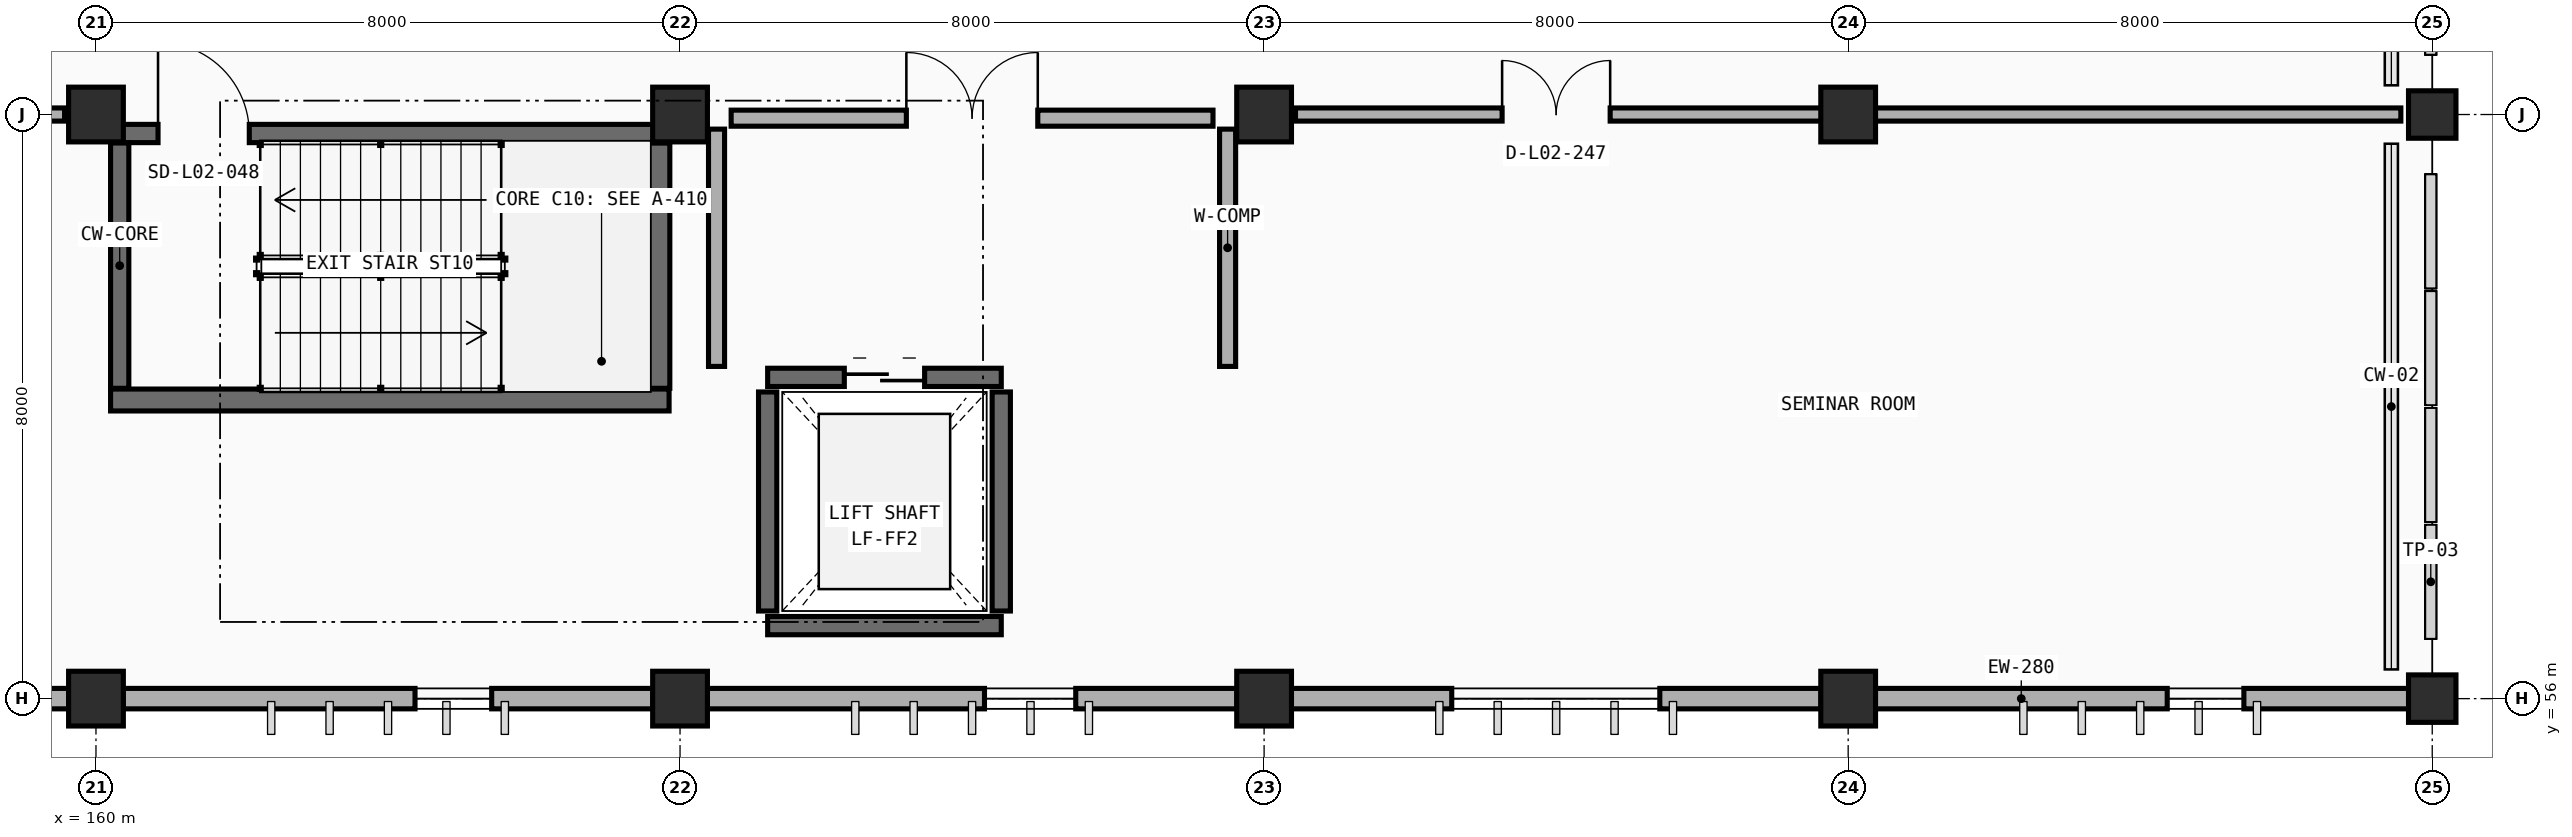
"""IFC4 building model, lengths in metres.
Left out: names, types, materials, properties, quantities, classifications, styles, units other than length and angle.
Written with IfcOpenShell. Run it as: python <this file> out.ifc"""

import sys

from ifc_helpers import new_model, si_unit, direction, frame, frame_2d, origin, origin_2d, place, context, subcontext, project, spatial, rectangle, extrude, element, fill, save


model = new_model("IFC4")
c1 = context("Model", 3, precision=1e-05, world=origin(), true_north=direction((0.0, 1.0)))
c2 = subcontext(c1, "Body", "Model", "MODEL_VIEW")
j1 = project(units=[si_unit("LENGTHUNIT", "METRE"), si_unit("PLANEANGLEUNIT", "RADIAN")], contexts=[c1])
p1 = place(None, origin())
s1 = spatial("IfcSite", under=j1, at=p1, CompositionType="ELEMENT")
p2 = place(p1, origin())
s2 = spatial("IfcBuilding", under=s1, at=p2, CompositionType="ELEMENT")
p3 = place(p2, frame((0.0, 0.0, 4.8)))
s3 = spatial("IfcBuildingStorey", under=s2, at=p3, CompositionType="ELEMENT", Elevation=4.8)
for number, where, z_axis, x_axis in (
    (1, (160.0, 56.0, 0.0), (0.0, 0.0, 1.0), (1.0, 0.0, 0.0)),
    (2, (168.0, 56.0, 0.0), (0.0, 0.0, 1.0), (1.0, 0.0, 0.0)),
    (3, (176.0, 56.0, 0.0), (0.0, 0.0, 1.0), (1.0, 0.0, 0.0)),
    (4, (184.0, 56.0, 0.0), (0.0, 0.0, 1.0), (1.0, 0.0, 0.0)),
):
    element("IfcColumn", number, at=place(p3, frame(where, z_axis=z_axis, x_axis=x_axis)), inside=s3, PredefinedType="COLUMN", context=c2, shape_type="SweptSolid", body=[
        extrude(rectangle(XDim=0.75, YDim=0.75, at=origin_2d()), origin(), (0.0, 0.0, 1.0), 4.8),
    ])
p4 = place(p3, frame((192.0, 56.0, 0.0), z_axis=(0.0, 0.0, 1.0), x_axis=(1.0, 0.0, 0.0)))
e5 = element("IfcColumn", 5, at=p4, inside=s3, PredefinedType="COLUMN", context=c2, shape_type="SweptSolid", body=[
    extrude(rectangle(XDim=0.65, YDim=0.65, at=origin_2d()), origin(), (0.0, 0.0, 1.0), 4.8),
])
for number, where, z_axis, x_axis in (
    (6, (160.0, 64.0, 0.0), (0.0, 0.0, 1.0), (1.0, 0.0, 0.0)),
    (7, (168.0, 64.0, 0.0), (0.0, 0.0, 1.0), (1.0, 0.0, 0.0)),
    (8, (176.0, 64.0, 0.0), (0.0, 0.0, 1.0), (1.0, 0.0, 0.0)),
    (9, (184.0, 64.0, 0.0), (0.0, 0.0, 1.0), (1.0, 0.0, 0.0)),
):
    element("IfcColumn", number, at=place(p3, frame(where, z_axis=z_axis, x_axis=x_axis)), inside=s3, PredefinedType="COLUMN", context=c2, shape_type="SweptSolid", body=[
        extrude(rectangle(XDim=0.75, YDim=0.75, at=origin_2d()), origin(), (0.0, 0.0, 1.0), 4.8),
    ])
p5 = place(p3, frame((192.0, 64.0, 0.0), z_axis=(0.0, 0.0, 1.0), x_axis=(1.0, 0.0, 0.0)))
e10 = element("IfcColumn", 10, at=p5, inside=s3, PredefinedType="COLUMN", context=c2, shape_type="SweptSolid", body=[
    extrude(rectangle(XDim=0.65, YDim=0.65, at=origin_2d()), origin(), (0.0, 0.0, 1.0), 4.8),
])
p6 = place(p3, frame((159.628, 56.0, 0.0), z_axis=(0.0, 0.0, 1.0), x_axis=(-1.0, 0.0, 0.0)))
e11 = element("IfcWall", 11, at=p6, inside=s3, PredefinedType="STANDARD", context=c2, shape_type="SweptSolid", body=[
    extrude(rectangle(XDim=7.256, YDim=0.28, at=frame_2d((3.628, 0.0))), origin(), (0.0, 0.0, 1.0), 3.91),
])
p7 = place(p6, frame((2.208, 0.0, 0.9)))
e12 = element("IfcOpeningElement", 12, at=p7, cuts=e11, PredefinedType="OPENING", context=c2, shape_type="SweptSolid", body=[
    extrude(rectangle(XDim=2.85, YDim=1.85, at=frame_2d((1.425, 0.925))), frame((0.0, 0.15, 0.0), z_axis=(0.0, -1.0, 0.0), x_axis=(1.0, 0.0, 0.0)), (0.0, 0.0, 1.0), 0.3),
])
p8 = place(p3, frame((167.628, 56.0, 0.0), z_axis=(0.0, 0.0, 1.0), x_axis=(-1.0, 0.0, 0.0)))
e13 = element("IfcWall", 13, at=p8, inside=s3, PredefinedType="STANDARD", context=c2, shape_type="SweptSolid", body=[
    extrude(rectangle(XDim=7.256, YDim=0.28, at=frame_2d((3.628, 0.0))), origin(), (0.0, 0.0, 1.0), 3.91),
])
p9 = place(p8, frame((2.208, 0.0, 0.9)))
e14 = element("IfcOpeningElement", 14, at=p9, cuts=e13, PredefinedType="OPENING", context=c2, shape_type="SweptSolid", body=[
    extrude(rectangle(XDim=1.05, YDim=2.0, at=frame_2d((0.525, 1.0))), frame((0.0, 0.15, 0.0), z_axis=(0.0, -1.0, 0.0), x_axis=(1.0, 0.0, 0.0)), (0.0, 0.0, 1.0), 0.3),
])
p10 = place(p3, frame((175.628, 56.0, 0.0), z_axis=(0.0, 0.0, 1.0), x_axis=(-1.0, 0.0, 0.0)))
e15 = element("IfcWall", 15, at=p10, inside=s3, PredefinedType="STANDARD", context=c2, shape_type="SweptSolid", body=[
    extrude(rectangle(XDim=7.256, YDim=0.28, at=frame_2d((3.628, 0.0))), origin(), (0.0, 0.0, 1.0), 3.91),
])
p11 = place(p10, frame((2.208, 0.0, 0.9)))
e16 = element("IfcOpeningElement", 16, at=p11, cuts=e15, PredefinedType="OPENING", context=c2, shape_type="SweptSolid", body=[
    extrude(rectangle(XDim=1.25, YDim=2.0, at=frame_2d((0.625, 1.0))), frame((0.0, 0.15, 0.0), z_axis=(0.0, -1.0, 0.0), x_axis=(1.0, 0.0, 0.0)), (0.0, 0.0, 1.0), 0.3),
])
p12 = place(p3, frame((183.628, 56.0, 0.0), z_axis=(0.0, 0.0, 1.0), x_axis=(-1.0, 0.0, 0.0)))
e17 = element("IfcWall", 17, at=p12, inside=s3, PredefinedType="STANDARD", context=c2, shape_type="SweptSolid", body=[
    extrude(rectangle(XDim=7.256, YDim=0.28, at=frame_2d((3.628, 0.0))), origin(), (0.0, 0.0, 1.0), 3.91),
])
p13 = place(p12, frame((2.208, 0.0, 0.9)))
e18 = element("IfcOpeningElement", 18, at=p13, cuts=e17, PredefinedType="OPENING", context=c2, shape_type="SweptSolid", body=[
    extrude(rectangle(XDim=2.85, YDim=1.85, at=frame_2d((1.425, 0.925))), frame((0.0, 0.15, 0.0), z_axis=(0.0, -1.0, 0.0), x_axis=(1.0, 0.0, 0.0)), (0.0, 0.0, 1.0), 0.3),
])
p14 = place(p3, frame((191.678, 56.0, 0.0), z_axis=(0.0, 0.0, 1.0), x_axis=(-1.0, 0.0, 0.0)))
e19 = element("IfcWall", 19, at=p14, inside=s3, PredefinedType="STANDARD", context=c2, shape_type="SweptSolid", body=[
    extrude(rectangle(XDim=7.306, YDim=0.28, at=frame_2d((3.653, 0.0))), origin(), (0.0, 0.0, 1.0), 3.91),
])
p15 = place(p14, frame((2.258, 0.0, 0.9)))
e20 = element("IfcOpeningElement", 20, at=p15, cuts=e19, PredefinedType="OPENING", context=c2, shape_type="SweptSolid", body=[
    extrude(rectangle(XDim=1.05, YDim=2.0, at=frame_2d((0.525, 1.0))), frame((0.0, 0.15, 0.0), z_axis=(0.0, -1.0, 0.0), x_axis=(1.0, 0.0, 0.0)), (0.0, 0.0, 1.0), 0.3),
])
for number, where, z_axis, x_axis in (
    (21, (191.76, 56.22, 0.0), (0.0, 0.0, 1.0), (-1.0, 0.0, 0.0)),
    (22, (191.76, 63.78, 0.0), (0.0, 0.0, 1.0), (-1.0, 0.0, 0.0)),
    (23, (191.76, 64.22, 0.0), (0.0, 0.0, 1.0), (-1.0, 0.0, 0.0)),
):
    element("IfcWall", number, at=place(p3, frame(where, z_axis=z_axis, x_axis=x_axis)), inside=s3, PredefinedType="PARAPET", context=c2, shape_type="SweptSolid", body=[
        extrude(rectangle(XDim=0.32, YDim=0.2, at=frame_2d((0.16, 0.0))), origin(), (0.0, 0.0, 1.0), 3.95),
    ])
p16 = place(p3, frame((160.2, 60.09, 0.0), z_axis=(0.0, 0.0, 1.0), x_axis=(1.0, 0.0, 0.0)))
e24 = element("IfcWall", 24, at=p16, inside=s3, PredefinedType="SHEAR", context=c2, shape_type="SweptSolid", body=[
    extrude(rectangle(XDim=7.65, YDim=0.3, at=frame_2d((3.825, 0.0))), origin(), (0.0, 0.0, 1.0), 4.8),
])
p17 = place(p3, frame((167.71, 60.25, 0.0), z_axis=(0.0, 0.0, 1.0), x_axis=(0.0, 1.0, 0.0)))
e25 = element("IfcWall", 25, at=p17, inside=s3, PredefinedType="SHEAR", context=c2, shape_type="SweptSolid", body=[
    extrude(rectangle(XDim=3.36, YDim=0.3, at=frame_2d((1.68, 0.0))), origin(), (0.0, 0.0, 1.0), 4.8),
])
p18 = place(p3, frame((160.2, 63.74, 0.0), z_axis=(0.0, 0.0, 1.0), x_axis=(1.0, 0.0, 0.0)))
e26 = element("IfcWall", 26, at=p18, inside=s3, PredefinedType="SOLIDWALL", context=c2, shape_type="SweptSolid", body=[
    extrude(rectangle(XDim=7.65, YDim=0.25, at=frame_2d((3.825, 0.0))), origin(), (0.0, 0.0, 1.0), 4.8),
])
p19 = place(p18, frame((0.65, 0.0, 0.0)))
e27 = element("IfcOpeningElement", 27, at=p19, cuts=e26, PredefinedType="OPENING", context=c2, shape_type="SweptSolid", body=[
    extrude(rectangle(XDim=1.25, YDim=2.15, at=frame_2d((0.625, 1.075))), frame((0.0, 0.135, 0.0), z_axis=(0.0, -1.0, 0.0), x_axis=(1.0, 0.0, 0.0)), (0.0, 0.0, 1.0), 0.27),
])
p20 = place(p3, frame((160.325, 60.25, 0.0), z_axis=(0.0, 0.0, 1.0), x_axis=(0.0, 1.0, 0.0)))
e28 = element("IfcWall", 28, at=p20, inside=s3, PredefinedType="SOLIDWALL", context=c2, shape_type="SweptSolid", body=[
    extrude(rectangle(XDim=3.36, YDim=0.25, at=frame_2d((1.68, 0.0))), origin(), (0.0, 0.0, 1.0), 4.8),
])
p21 = place(p3, frame((169.2, 57.0, 0.0), z_axis=(0.0, 0.0, 1.0), x_axis=(1.0, 0.0, 0.0)))
e29 = element("IfcWall", 29, at=p21, inside=s3, PredefinedType="SOLIDWALL", context=c2, shape_type="SweptSolid", body=[
    extrude(rectangle(XDim=3.2, YDim=0.25, at=frame_2d((1.6, 0.0))), origin(), (0.0, 0.0, 1.0), 4.8),
])
p22 = place(p3, frame((169.2, 60.4, 0.0), z_axis=(0.0, 0.0, 1.0), x_axis=(1.0, 0.0, 0.0)))
e30 = element("IfcWall", 30, at=p22, inside=s3, PredefinedType="SOLIDWALL", context=c2, shape_type="SweptSolid", body=[
    extrude(rectangle(XDim=3.2, YDim=0.25, at=frame_2d((1.6, 0.0))), origin(), (0.0, 0.0, 1.0), 4.8),
])
p23 = place(p22, frame((1.05, 0.0, 0.0)))
e31 = element("IfcOpeningElement", 31, at=p23, cuts=e30, PredefinedType="OPENING", context=c2, shape_type="SweptSolid", body=[
    extrude(rectangle(XDim=1.1, YDim=2.15, at=frame_2d((0.55, 1.075))), frame((0.0, 0.135, 0.0), z_axis=(0.0, -1.0, 0.0), x_axis=(1.0, 0.0, 0.0)), (0.0, 0.0, 1.0), 0.27),
])
for number, where, z_axis, x_axis in (
    (32, (169.2, 57.2, 0.0), (0.0, 0.0, 1.0), (0.0, 1.0, 0.0)),
    (33, (172.4, 57.2, 0.0), (0.0, 0.0, 1.0), (0.0, 1.0, 0.0)),
):
    element("IfcWall", number, at=place(p3, frame(where, z_axis=z_axis, x_axis=x_axis)), inside=s3, PredefinedType="SOLIDWALL", context=c2, shape_type="SweptSolid", body=[
        extrude(rectangle(XDim=3.0, YDim=0.25, at=frame_2d((1.5, 0.0))), origin(), (0.0, 0.0, 1.0), 4.8),
    ])
p24 = place(p3, frame((168.7, 63.95, 0.0), z_axis=(0.0, 0.0, 1.0), x_axis=(1.0, 0.0, 0.0)))
e34 = element("IfcWall", 34, at=p24, inside=s3, PredefinedType="PARTITIONING", context=c2, shape_type="SweptSolid", body=[
    extrude(rectangle(XDim=6.6, YDim=0.22, at=frame_2d((3.3, 0.0))), origin(), (0.0, 0.0, 1.0), 3.86),
])
p25 = place(p24, frame((2.4, 0.0, 0.0)))
e35 = element("IfcOpeningElement", 35, at=p25, cuts=e34, PredefinedType="OPENING", context=c2, shape_type="SweptSolid", body=[
    extrude(rectangle(XDim=1.8, YDim=2.2, at=frame_2d((0.9, 1.1))), frame((0.0, 0.12, 0.0), z_axis=(0.0, -1.0, 0.0), x_axis=(1.0, 0.0, 0.0)), (0.0, 0.0, 1.0), 0.24),
])
for number, where, z_axis, x_axis in (
    (36, (168.5, 60.55, 0.0), (0.0, 0.0, 1.0), (0.0, 1.0, 0.0)),
    (37, (175.5, 60.55, 0.0), (0.0, 0.0, 1.0), (0.0, 1.0, 0.0)),
):
    element("IfcWall", number, at=place(p3, frame(where, z_axis=z_axis, x_axis=x_axis)), inside=s3, PredefinedType="PARTITIONING", context=c2, shape_type="SweptSolid", body=[
        extrude(rectangle(XDim=3.25, YDim=0.22, at=frame_2d((1.625, 0.0))), origin(), (0.0, 0.0, 1.0), 3.76),
    ])
p26 = place(p3, frame((136.43, 64.0, 0.0), z_axis=(0.0, 0.0, 1.0), x_axis=(1.0, 0.0, 0.0)))
e38 = element("IfcWall", 38, at=p26, inside=s3, PredefinedType="PARTITIONING", context=c2, shape_type="SweptSolid", body=[
    extrude(rectangle(XDim=23.14, YDim=0.18, at=frame_2d((11.57, 0.0))), origin(), (0.0, 0.0, 1.0), 3.86),
])
p27 = place(p26, frame((3.045, 0.0, 0.0)))
e39 = element("IfcOpeningElement", 39, at=p27, cuts=e38, PredefinedType="OPENING", context=c2, shape_type="SweptSolid", body=[
    extrude(rectangle(XDim=1.05, YDim=2.15, at=frame_2d((0.525, 1.075))), frame((0.0, 0.1, 0.0), z_axis=(0.0, -1.0, 0.0), x_axis=(1.0, 0.0, 0.0)), (0.0, 0.0, 1.0), 0.2),
])
p28 = place(p3, frame((176.43, 64.0, 0.0), z_axis=(0.0, 0.0, 1.0), x_axis=(1.0, 0.0, 0.0)))
e40 = element("IfcWall", 40, at=p28, inside=s3, PredefinedType="PARTITIONING", context=c2, shape_type="SweptSolid", body=[
    extrude(rectangle(XDim=15.14, YDim=0.18, at=frame_2d((7.57, 0.0))), origin(), (0.0, 0.0, 1.0), 3.86),
])
p29 = place(p28, frame((2.83, 0.0, 0.0)))
e41 = element("IfcOpeningElement", 41, at=p29, cuts=e40, PredefinedType="OPENING", context=c2, shape_type="SweptSolid", body=[
    extrude(rectangle(XDim=1.48, YDim=2.2, at=frame_2d((0.74, 1.1))), frame((0.0, 0.1, 0.0), z_axis=(0.0, -1.0, 0.0), x_axis=(1.0, 0.0, 0.0)), (0.0, 0.0, 1.0), 0.2),
])
p30 = place(p9, origin())
e42 = element("IfcWindow", 42, at=p30, inside=s3, PartitioningType="SINGLE_PANEL", PredefinedType="WINDOW", context=c2, shape_type="SweptSolid", body=[
    extrude(rectangle(XDim=1.05, YDim=2.0, at=frame_2d((0.525, 1.0))), frame((0.0, 0.03, 0.0), z_axis=(0.0, -1.0, 0.0), x_axis=(1.0, 0.0, 0.0)), (0.0, 0.0, 1.0), 0.06),
])
fill(e14, e42)
p31 = place(p11, origin())
e43 = element("IfcWindow", 43, at=p31, inside=s3, PartitioningType="SINGLE_PANEL", PredefinedType="WINDOW", context=c2, shape_type="SweptSolid", body=[
    extrude(rectangle(XDim=1.25, YDim=2.0, at=frame_2d((0.625, 1.0))), frame((0.0, 0.03, 0.0), z_axis=(0.0, -1.0, 0.0), x_axis=(1.0, 0.0, 0.0)), (0.0, 0.0, 1.0), 0.06),
])
fill(e16, e43)
p32 = place(p13, origin())
e44 = element("IfcWindow", 44, at=p32, inside=s3, PartitioningType="DOUBLE_PANEL_VERTICAL", PredefinedType="WINDOW", context=c2, shape_type="SweptSolid", body=[
    extrude(rectangle(XDim=2.85, YDim=1.85, at=frame_2d((1.425, 0.925))), frame((0.0, 0.03, 0.0), z_axis=(0.0, -1.0, 0.0), x_axis=(1.0, 0.0, 0.0)), (0.0, 0.0, 1.0), 0.06),
])
fill(e18, e44)
p33 = place(p15, origin())
e45 = element("IfcWindow", 45, at=p33, inside=s3, PartitioningType="SINGLE_PANEL", PredefinedType="WINDOW", context=c2, shape_type="SweptSolid", body=[
    extrude(rectangle(XDim=1.05, YDim=2.0, at=frame_2d((0.525, 1.0))), frame((0.0, 0.03, 0.0), z_axis=(0.0, -1.0, 0.0), x_axis=(1.0, 0.0, 0.0)), (0.0, 0.0, 1.0), 0.06),
])
fill(e20, e45)
p34 = place(p19, origin())
e46 = element("IfcDoor", 46, at=p34, inside=s3, OperationType="SINGLE_SWING_LEFT", PredefinedType="DOOR", context=c2, shape_type="SweptSolid", body=[
    extrude(rectangle(XDim=1.25, YDim=2.15, at=frame_2d((0.625, 1.075))), frame((0.0, 0.025, 0.0), z_axis=(0.0, -1.0, 0.0), x_axis=(1.0, 0.0, 0.0)), (0.0, 0.0, 1.0), 0.05),
])
fill(e27, e46)
p35 = place(p23, origin())
e47 = element("IfcDoor", 47, at=p35, inside=s3, OperationType="DOUBLE_DOOR_SLIDING", PredefinedType="DOOR", context=c2, shape_type="SweptSolid", body=[
    extrude(rectangle(XDim=1.1, YDim=2.15, at=frame_2d((0.55, 1.075))), frame((0.0, 0.025, 0.0), z_axis=(0.0, -1.0, 0.0), x_axis=(1.0, 0.0, 0.0)), (0.0, 0.0, 1.0), 0.05),
])
fill(e31, e47)
p36 = place(p25, origin())
e48 = element("IfcDoor", 48, at=p36, inside=s3, OperationType="DOUBLE_DOOR_SINGLE_SWING", PredefinedType="DOOR", context=c2, shape_type="SweptSolid", body=[
    extrude(rectangle(XDim=1.8, YDim=2.2, at=frame_2d((0.9, 1.1))), frame((0.0, 0.025, 0.0), z_axis=(0.0, -1.0, 0.0), x_axis=(1.0, 0.0, 0.0)), (0.0, 0.0, 1.0), 0.05),
])
fill(e35, e48)
p37 = place(p29, origin())
e49 = element("IfcDoor", 49, at=p37, inside=s3, OperationType="DOUBLE_DOOR_SINGLE_SWING", PredefinedType="DOOR", context=c2, shape_type="SweptSolid", body=[
    extrude(rectangle(XDim=1.48, YDim=2.2, at=frame_2d((0.74, 1.1))), frame((0.0, 0.025, 0.0), z_axis=(0.0, -1.0, 0.0), x_axis=(1.0, 0.0, 0.0)), (0.0, 0.0, 1.0), 0.05),
])
fill(e41, e49)
save(model, sys.argv[1])
